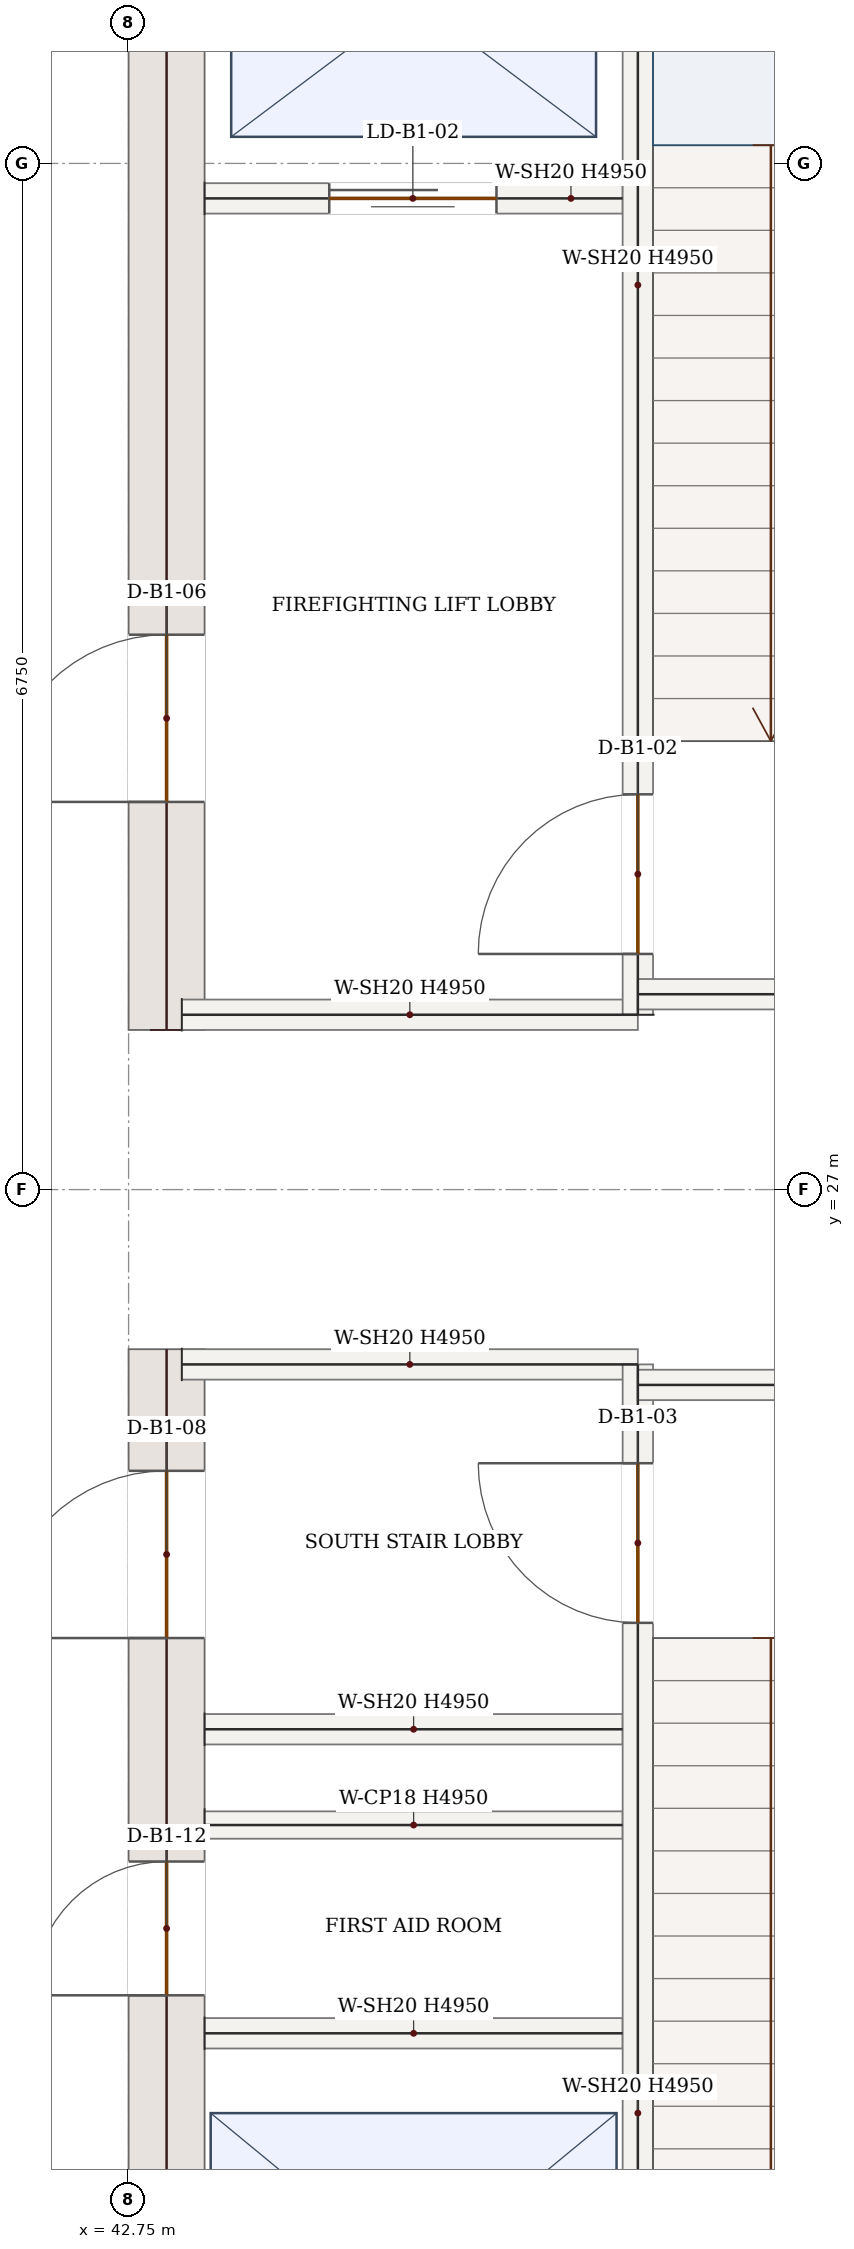
"""IFC4 building model, lengths in metres.
Left out: names, types, materials, properties, quantities, classifications, styles, units other than length and angle.
Written with IfcOpenShell. Run it as: python <this file> out.ifc"""

import sys

from ifc_helpers import new_model, si_unit, direction, frame, frame_2d, origin, place, context, subcontext, project, spatial, rectangle, extrude, source, transform, mapped, element, fill, save


model = new_model("IFC4")
c1 = context("Model", 3, precision=1e-05, world=origin(), true_north=direction((0.0, 1.0)))
c2 = subcontext(c1, "Body", "Model", "MODEL_VIEW")
j1 = project(units=[si_unit("LENGTHUNIT", "METRE"), si_unit("PLANEANGLEUNIT", "RADIAN")], contexts=[c1])
p1 = place(None, origin())
s1 = spatial("IfcSite", under=j1, at=p1, CompositionType="ELEMENT")
p2 = place(p1, origin())
s2 = spatial("IfcBuilding", under=s1, at=p2, CompositionType="ELEMENT")
p3 = place(p2, frame((0.0, 0.0, -5.4)))
s3 = spatial("IfcBuildingStorey", under=s2, at=p3, CompositionType="ELEMENT", Elevation=-5.4)
p4 = place(p3, frame((43.0, 17.4, 0.0), z_axis=(0.0, 0.0, 1.0), x_axis=(0.0, 1.0, 0.0)))
e1 = element("IfcWall", 1, at=p4, inside=s3, PredefinedType="SHEAR", context=c2, shape_type="SweptSolid", body=[
    extrude(rectangle(XDim=8.55, YDim=0.5, at=frame_2d((4.275, 0.0))), origin(), (0.0, 0.0, 1.0), 4.95),
])
p5 = place(p4, frame((6.65, 0.0, 0.0)))
e2 = element("IfcOpeningElement", 2, at=p5, cuts=e1, PredefinedType="OPENING", context=c2, shape_type="SweptSolid", body=[
    extrude(rectangle(XDim=1.1, YDim=2.2, at=frame_2d((0.55, 1.1))), frame((0.0, 0.26, 0.0), z_axis=(0.0, -1.0, 0.0), x_axis=(1.0, 0.0, 0.0)), (0.0, 0.0, 1.0), 0.52),
])
p6 = place(p4, frame((1.75, 0.0, 0.0)))
e3 = element("IfcOpeningElement", 3, at=p6, cuts=e1, PredefinedType="OPENING", context=c2, shape_type="SweptSolid", body=[
    extrude(rectangle(XDim=1.3, YDim=2.2, at=frame_2d((0.65, 1.1))), frame((0.0, 0.26, 0.0), z_axis=(0.0, -1.0, 0.0), x_axis=(1.0, 0.0, 0.0)), (0.0, 0.0, 1.0), 0.52),
])
p7 = place(p4, frame((4.3, 0.0, 0.0)))
e4 = element("IfcOpeningElement", 4, at=p7, cuts=e1, PredefinedType="OPENING", context=c2, shape_type="SweptSolid", body=[
    extrude(rectangle(XDim=0.88, YDim=2.1, at=frame_2d((0.44, 1.05))), frame((0.0, 0.26, 0.0), z_axis=(0.0, -1.0, 0.0), x_axis=(1.0, 0.0, 0.0)), (0.0, 0.0, 1.0), 0.52),
])
p8 = place(p3, frame((43.0, 28.05, 0.0), z_axis=(0.0, 0.0, 1.0), x_axis=(0.0, 1.0, 0.0)))
e5 = element("IfcWall", 5, at=p8, inside=s3, PredefinedType="SHEAR", context=c2, shape_type="SweptSolid", body=[
    extrude(rectangle(XDim=8.55, YDim=0.5, at=frame_2d((4.275, 0.0))), origin(), (0.0, 0.0, 1.0), 4.95),
])
p9 = place(p8, frame((1.5, 0.0, 0.0)))
e6 = element("IfcOpeningElement", 6, at=p9, cuts=e5, PredefinedType="OPENING", context=c2, shape_type="SweptSolid", body=[
    extrude(rectangle(XDim=1.1, YDim=2.2, at=frame_2d((0.55, 1.1))), frame((0.0, 0.26, 0.0), z_axis=(0.0, -1.0, 0.0), x_axis=(1.0, 0.0, 0.0)), (0.0, 0.0, 1.0), 0.52),
])
p10 = place(p3, frame((46.1, 17.85, 0.0), z_axis=(0.0, 0.0, 1.0), x_axis=(0.0, 1.0, 0.0)))
e7 = element("IfcWall", 7, at=p10, inside=s3, PredefinedType="SOLIDWALL", context=c2, shape_type="SweptSolid", body=[
    extrude(rectangle(XDim=8.0, YDim=0.2, at=frame_2d((4.0, 0.0))), origin(), (0.0, 0.0, 1.0), 4.95),
])
p11 = place(p10, frame((6.3, 0.0, 0.0)))
e8 = element("IfcOpeningElement", 8, at=p11, cuts=e7, PredefinedType="OPENING", context=c2, shape_type="SweptSolid", body=[
    extrude(rectangle(XDim=1.05, YDim=2.15, at=frame_2d((0.525, 1.075))), frame((0.0, 0.11, 0.0), z_axis=(0.0, -1.0, 0.0), x_axis=(1.0, 0.0, 0.0)), (0.0, 0.0, 1.0), 0.22),
])
p12 = place(p3, frame((46.1, 28.15, 0.0), z_axis=(0.0, 0.0, 1.0), x_axis=(0.0, 1.0, 0.0)))
e9 = element("IfcWall", 9, at=p12, inside=s3, PredefinedType="SOLIDWALL", context=c2, shape_type="SweptSolid", body=[
    extrude(rectangle(XDim=8.0, YDim=0.2, at=frame_2d((4.0, 0.0))), origin(), (0.0, 0.0, 1.0), 4.95),
])
p13 = place(p12, frame((0.4, 0.0, 0.0)))
e10 = element("IfcOpeningElement", 10, at=p13, cuts=e9, PredefinedType="OPENING", context=c2, shape_type="SweptSolid", body=[
    extrude(rectangle(XDim=1.05, YDim=2.15, at=frame_2d((0.525, 1.075))), frame((0.0, 0.11, 0.0), z_axis=(0.0, -1.0, 0.0), x_axis=(1.0, 0.0, 0.0)), (0.0, 0.0, 1.0), 0.22),
])
m1 = source(origin(), c2, "Body", "SweptSolid", [
    extrude(rectangle(XDim=3.0, YDim=0.2, at=frame_2d((1.5, 0.0))), origin(), (0.0, 0.0, 1.0), 4.95),
])
p14 = place(p3, frame((43.1, 25.85, 0.0), z_axis=(0.0, 0.0, 1.0), x_axis=(1.0, 0.0, 0.0)))
e11 = element("IfcWall", 11, at=p14, inside=s3, PredefinedType="SOLIDWALL", context=c2, shape_type="MappedRepresentation", body=[
    mapped(m1, transform((0.0, 0.0, 0.0), x_axis=(1.0, 0.0, 0.0), y_axis=(0.0, 1.0, 0.0), z_axis=(0.0, 0.0, 1.0), scale=1.0)),
])
m2 = source(origin(), c2, "Body", "SweptSolid", [
    extrude(rectangle(XDim=4.25, YDim=0.2, at=frame_2d((2.125, 0.0))), origin(), (0.0, 0.0, 1.0), 4.95),
])
p15 = place(p3, frame((46.1, 25.715, 0.0), z_axis=(0.0, 0.0, 1.0), x_axis=(1.0, 0.0, 0.0)))
e12 = element("IfcWall", 12, at=p15, inside=s3, PredefinedType="SOLIDWALL", context=c2, shape_type="MappedRepresentation", body=[
    mapped(m2, transform((0.0, 0.0, 0.0), x_axis=(1.0, 0.0, 0.0), y_axis=(0.0, 1.0, 0.0), z_axis=(0.0, 0.0, 1.0), scale=1.0)),
])
p16 = place(p3, frame((43.1, 28.15, 0.0), z_axis=(0.0, 0.0, 1.0), x_axis=(1.0, 0.0, 0.0)))
e13 = element("IfcWall", 13, at=p16, inside=s3, PredefinedType="SOLIDWALL", context=c2, shape_type="MappedRepresentation", body=[
    mapped(m1, transform((0.0, 0.0, 0.0), x_axis=(1.0, 0.0, 0.0), y_axis=(0.0, 1.0, 0.0), z_axis=(0.0, 0.0, 1.0), scale=1.0)),
])
p17 = place(p3, frame((46.1, 28.285, 0.0), z_axis=(0.0, 0.0, 1.0), x_axis=(1.0, 0.0, 0.0)))
e14 = element("IfcWall", 14, at=p17, inside=s3, PredefinedType="SOLIDWALL", context=c2, shape_type="MappedRepresentation", body=[
    mapped(m2, transform((0.0, 0.0, 0.0), x_axis=(1.0, 0.0, 0.0), y_axis=(0.0, 1.0, 0.0), z_axis=(0.0, 0.0, 1.0), scale=1.0)),
])
p18 = place(p3, frame((43.25, 33.52, 0.0), z_axis=(0.0, 0.0, 1.0), x_axis=(1.0, 0.0, 0.0)))
e15 = element("IfcWall", 15, at=p18, inside=s3, PredefinedType="SOLIDWALL", context=c2, shape_type="SweptSolid", body=[
    extrude(rectangle(XDim=2.75, YDim=0.2, at=frame_2d((1.375, 0.0))), origin(), (0.0, 0.0, 1.0), 4.95),
])
p19 = place(p18, frame((0.82, 0.0, 0.0)))
e16 = element("IfcOpeningElement", 16, at=p19, cuts=e15, PredefinedType="OPENING", context=c2, shape_type="SweptSolid", body=[
    extrude(rectangle(XDim=1.1, YDim=2.15, at=frame_2d((0.55, 1.075))), frame((0.0, 0.11, 0.0), z_axis=(0.0, -1.0, 0.0), x_axis=(1.0, 0.0, 0.0)), (0.0, 0.0, 1.0), 0.22),
])
m3 = source(origin(), c2, "Body", "SweptSolid", [
    extrude(rectangle(XDim=2.75, YDim=0.2, at=frame_2d((1.375, 0.0))), origin(), (0.0, 0.0, 1.0), 4.95),
])
for number, where, z_axis, x_axis in (
    (17, (43.25, 23.45, 0.0), (0.0, 0.0, 1.0), (1.0, 0.0, 0.0)),
    (18, (43.25, 21.45, 0.0), (0.0, 0.0, 1.0), (1.0, 0.0, 0.0)),
):
    element("IfcWall", number, at=place(p3, frame(where, z_axis=z_axis, x_axis=x_axis)), inside=s3, PredefinedType="SOLIDWALL", context=c2, shape_type="MappedRepresentation", body=[
        mapped(m3, transform((0.0, 0.0, 0.0), x_axis=(1.0, 0.0, 0.0), y_axis=(0.0, 1.0, 0.0), z_axis=(0.0, 0.0, 1.0), scale=1.0)),
    ])
m4 = source(origin(), c2, "Body", "SweptSolid", [
    extrude(rectangle(XDim=2.75, YDim=0.18, at=frame_2d((1.375, 0.0))), origin(), (0.0, 0.0, 1.0), 4.95),
])
p20 = place(p3, frame((43.25, 22.82, 0.0), z_axis=(0.0, 0.0, 1.0), x_axis=(1.0, 0.0, 0.0)))
e19 = element("IfcWall", 19, at=p20, inside=s3, PredefinedType="PARTITIONING", context=c2, shape_type="MappedRepresentation", body=[
    mapped(m4, transform((0.0, 0.0, 0.0), x_axis=(1.0, 0.0, 0.0), y_axis=(0.0, 1.0, 0.0), z_axis=(0.0, 0.0, 1.0), scale=1.0)),
])
m5 = source(origin(), c2, "Body", "SweptSolid", [
    extrude(rectangle(XDim=1.05, YDim=2.15, at=frame_2d((0.525, 1.075))), frame((0.0, 0.025, 0.0), z_axis=(0.0, -1.0, 0.0), x_axis=(1.0, 0.0, 0.0)), (0.0, 0.0, 1.0), 0.05),
])
p21 = place(p13, origin())
e20 = element("IfcDoor", 20, at=p21, inside=s3, OperationType="SINGLE_SWING_LEFT", PredefinedType="DOOR", context=c2, shape_type="MappedRepresentation", body=[
    mapped(m5, transform((0.0, 0.0, 0.0), x_axis=(1.0, 0.0, 0.0), y_axis=(0.0, 1.0, 0.0), z_axis=(0.0, 0.0, 1.0), scale=1.0)),
])
fill(e10, e20)
p22 = place(p11, origin())
e21 = element("IfcDoor", 21, at=p22, inside=s3, OperationType="SINGLE_SWING_RIGHT", PredefinedType="DOOR", context=c2, shape_type="MappedRepresentation", body=[
    mapped(m5, transform((0.0, 0.0, 0.0), x_axis=(1.0, 0.0, 0.0), y_axis=(0.0, 1.0, 0.0), z_axis=(0.0, 0.0, 1.0), scale=1.0)),
])
fill(e8, e21)
m6 = source(origin(), c2, "Body", "SweptSolid", [
    extrude(rectangle(XDim=1.1, YDim=2.15, at=frame_2d((0.55, 1.075))), frame((0.0, 0.025, 0.0), z_axis=(0.0, -1.0, 0.0), x_axis=(1.0, 0.0, 0.0)), (0.0, 0.0, 1.0), 0.05),
])
p23 = place(p19, origin())
e22 = element("IfcDoor", 22, at=p23, inside=s3, OperationType="DOUBLE_DOOR_SLIDING", PredefinedType="DOOR", context=c2, shape_type="MappedRepresentation", body=[
    mapped(m6, transform((0.0, 0.0, 0.0), x_axis=(1.0, 0.0, 0.0), y_axis=(0.0, 1.0, 0.0), z_axis=(0.0, 0.0, 1.0), scale=1.0)),
])
fill(e16, e22)
m7 = source(origin(), c2, "Body", "SweptSolid", [
    extrude(rectangle(XDim=1.1, YDim=2.2, at=frame_2d((0.55, 1.1))), frame((0.0, 0.025, 0.0), z_axis=(0.0, -1.0, 0.0), x_axis=(1.0, 0.0, 0.0)), (0.0, 0.0, 1.0), 0.05),
])
p24 = place(p9, origin())
e23 = element("IfcDoor", 23, at=p24, inside=s3, OperationType="SINGLE_SWING_LEFT", PredefinedType="DOOR", context=c2, shape_type="MappedRepresentation", body=[
    mapped(m7, transform((0.0, 0.0, 0.0), x_axis=(1.0, 0.0, 0.0), y_axis=(0.0, 1.0, 0.0), z_axis=(0.0, 0.0, 1.0), scale=1.0)),
])
fill(e6, e23)
p25 = place(p5, origin())
e24 = element("IfcDoor", 24, at=p25, inside=s3, OperationType="SINGLE_SWING_LEFT", PredefinedType="DOOR", context=c2, shape_type="MappedRepresentation", body=[
    mapped(m7, transform((0.0, 0.0, 0.0), x_axis=(1.0, 0.0, 0.0), y_axis=(0.0, 1.0, 0.0), z_axis=(0.0, 0.0, 1.0), scale=1.0)),
])
fill(e2, e24)
m8 = source(origin(), c2, "Body", "SweptSolid", [
    extrude(rectangle(XDim=0.88, YDim=2.1, at=frame_2d((0.44, 1.05))), frame((0.0, 0.025, 0.0), z_axis=(0.0, -1.0, 0.0), x_axis=(1.0, 0.0, 0.0)), (0.0, 0.0, 1.0), 0.05),
])
p26 = place(p7, origin())
e25 = element("IfcDoor", 25, at=p26, inside=s3, OperationType="SINGLE_SWING_LEFT", PredefinedType="DOOR", context=c2, shape_type="MappedRepresentation", body=[
    mapped(m8, transform((0.0, 0.0, 0.0), x_axis=(1.0, 0.0, 0.0), y_axis=(0.0, 1.0, 0.0), z_axis=(0.0, 0.0, 1.0), scale=1.0)),
])
fill(e4, e25)
save(model, sys.argv[1])
